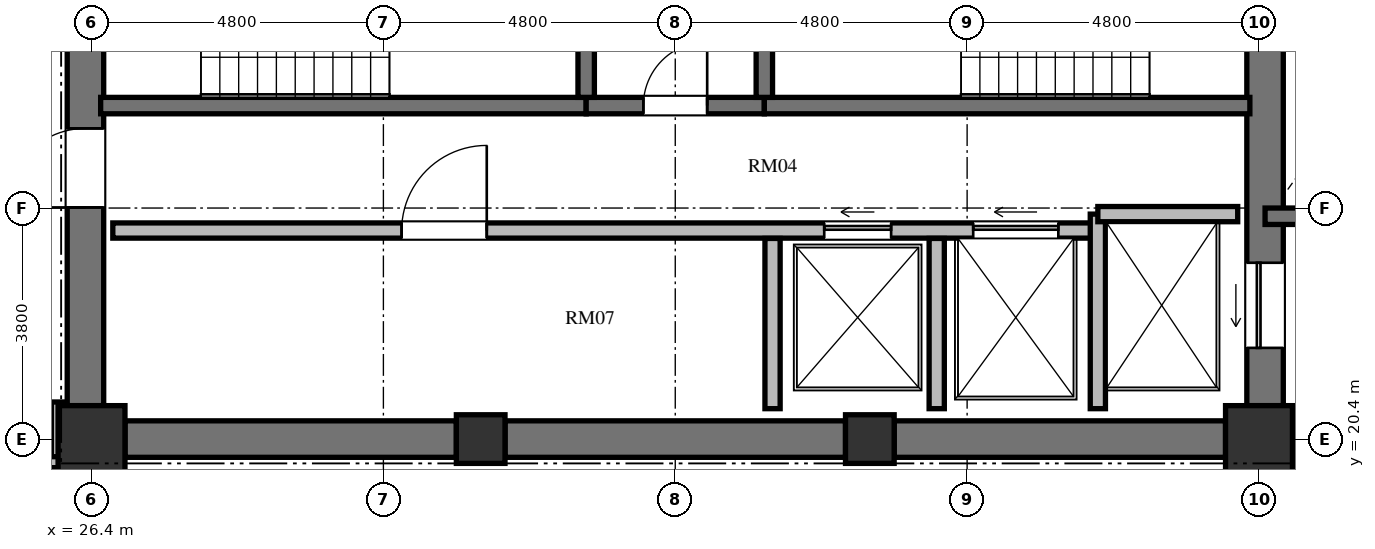
"""IFC4 building model, lengths in metres.
Left out: names, types, materials, properties, quantities, classifications, styles, units other than length and angle.
Written with IfcOpenShell. Run it as: python <this file> out.ifc"""

import sys

from ifc_helpers import new_model, si_unit, direction, frame, frame_2d, origin, origin_2d, place, context, subcontext, project, spatial, rectangle, extrude, element, fill, save


model = new_model("IFC4")
c1 = context("Model", 3, precision=1e-05, world=origin(), true_north=direction((0.0, 1.0)))
c2 = subcontext(c1, "Body", "Model", "MODEL_VIEW")
j1 = project(units=[si_unit("LENGTHUNIT", "METRE"), si_unit("PLANEANGLEUNIT", "RADIAN")], contexts=[c1])
p1 = place(None, origin())
s1 = spatial("IfcSite", under=j1, at=p1, CompositionType="ELEMENT")
p2 = place(p1, origin())
s2 = spatial("IfcBuilding", under=s1, at=p2, CompositionType="ELEMENT")
p3 = place(p2, frame((0.0, 0.0, 202.128)))
s3 = spatial("IfcBuildingStorey", under=s2, at=p3, CompositionType="ELEMENT", Elevation=202.128)
p4 = place(p3, frame((26.4, 20.4, 0.0), z_axis=(0.0, 0.0, 1.0), x_axis=(1.0, 0.0, 0.0)))
e1 = element("IfcColumn", 1, at=p4, inside=s3, PredefinedType="COLUMN", context=c2, shape_type="SweptSolid", body=[
    extrude(rectangle(XDim=1.1, YDim=1.1, at=origin_2d()), origin(), (0.0, 0.0, 1.0), 3.648),
])
for number, where, z_axis, x_axis in (
    (2, (32.8, 20.4, 0.0), (0.0, 0.0, 1.0), (1.0, 0.0, 0.0)),
    (3, (39.2, 20.4, 0.0), (0.0, 0.0, 1.0), (1.0, 0.0, 0.0)),
):
    element("IfcColumn", number, at=place(p3, frame(where, z_axis=z_axis, x_axis=x_axis)), inside=s3, PredefinedType="COLUMN", context=c2, shape_type="SweptSolid", body=[
        extrude(rectangle(XDim=0.8, YDim=0.8, at=origin_2d()), origin(), (0.0, 0.0, 1.0), 3.648),
    ])
p5 = place(p3, frame((45.6, 20.4, 0.0), z_axis=(0.0, 0.0, 1.0), x_axis=(1.0, 0.0, 0.0)))
e4 = element("IfcColumn", 4, at=p5, inside=s3, PredefinedType="COLUMN", context=c2, shape_type="SweptSolid", body=[
    extrude(rectangle(XDim=1.1, YDim=1.1, at=origin_2d()), origin(), (0.0, 0.0, 1.0), 3.648),
])
p6 = place(p3, frame((26.3, 20.95, 0.0), z_axis=(0.0, 0.0, 1.0), x_axis=(0.0, 1.0, 0.0)))
e5 = element("IfcWall", 5, at=p6, inside=s3, PredefinedType="SHEAR", context=c2, shape_type="SweptSolid", body=[
    extrude(rectangle(XDim=14.1, YDim=0.6, at=frame_2d((7.05, 0.0))), origin(), (0.0, 0.0, 1.0), 3.648),
])
p7 = place(p6, frame((6.5, 0.0, 0.0)))
e6 = element("IfcOpeningElement", 6, at=p7, cuts=e5, PredefinedType="OPENING", context=c2, shape_type="SweptSolid", body=[
    extrude(rectangle(XDim=1.2, YDim=2.15, at=frame_2d((0.6, 1.075))), frame((0.0, 0.31, 0.0), z_axis=(0.0, -1.0, 0.0), x_axis=(1.0, 0.0, 0.0)), (0.0, 0.0, 1.0), 0.62),
])
p8 = place(p6, frame((9.6, 0.0, 0.0)))
e7 = element("IfcOpeningElement", 7, at=p8, cuts=e5, PredefinedType="OPENING", context=c2, shape_type="SweptSolid", body=[
    extrude(rectangle(XDim=1.3, YDim=2.2, at=frame_2d((0.65, 1.1))), frame((0.0, 0.31, 0.0), z_axis=(0.0, -1.0, 0.0), x_axis=(1.0, 0.0, 0.0)), (0.0, 0.0, 1.0), 0.62),
])
p9 = place(p6, frame((3.26, 0.0, 0.0)))
e8 = element("IfcOpeningElement", 8, at=p9, cuts=e5, PredefinedType="OPENING", context=c2, shape_type="SweptSolid", body=[
    extrude(rectangle(XDim=1.3, YDim=2.2, at=frame_2d((0.65, 1.1))), frame((0.0, 0.31, 0.0), z_axis=(0.0, -1.0, 0.0), x_axis=(1.0, 0.0, 0.0)), (0.0, 0.0, 1.0), 0.62),
])
p10 = place(p3, frame((45.7, 20.95, 0.0), z_axis=(0.0, 0.0, 1.0), x_axis=(0.0, 1.0, 0.0)))
e9 = element("IfcWall", 9, at=p10, inside=s3, PredefinedType="SHEAR", context=c2, shape_type="SweptSolid", body=[
    extrude(rectangle(XDim=14.1, YDim=0.6, at=frame_2d((7.05, 0.0))), origin(), (0.0, 0.0, 1.0), 3.648),
])
p11 = place(p10, frame((11.75, 0.0, 0.0)))
e10 = element("IfcOpeningElement", 10, at=p11, cuts=e9, PredefinedType="OPENING", context=c2, shape_type="SweptSolid", body=[
    extrude(rectangle(XDim=1.4, YDim=2.3, at=frame_2d((0.7, 1.15))), frame((0.0, 0.31, 0.0), z_axis=(0.0, -1.0, 0.0), x_axis=(1.0, 0.0, 0.0)), (0.0, 0.0, 1.0), 0.62),
])
p12 = place(p10, frame((0.95, 0.0, 0.0)))
e11 = element("IfcOpeningElement", 11, at=p12, cuts=e9, PredefinedType="OPENING", context=c2, shape_type="SweptSolid", body=[
    extrude(rectangle(XDim=1.4, YDim=2.3, at=frame_2d((0.7, 1.15))), frame((0.0, 0.31, 0.0), z_axis=(0.0, -1.0, 0.0), x_axis=(1.0, 0.0, 0.0)), (0.0, 0.0, 1.0), 0.62),
])
p13 = place(p3, frame((26.95, 20.4, 0.0), z_axis=(0.0, 0.0, 1.0), x_axis=(1.0, 0.0, 0.0)))
e12 = element("IfcWall", 12, at=p13, inside=s3, PredefinedType="SHEAR", context=c2, shape_type="SweptSolid", body=[
    extrude(rectangle(XDim=5.45, YDim=0.6, at=frame_2d((2.725, 0.0))), origin(), (0.0, 0.0, 1.0), 3.648),
])
p14 = place(p3, frame((33.2, 20.4, 0.0), z_axis=(0.0, 0.0, 1.0), x_axis=(1.0, 0.0, 0.0)))
e13 = element("IfcWall", 13, at=p14, inside=s3, PredefinedType="SHEAR", context=c2, shape_type="SweptSolid", body=[
    extrude(rectangle(XDim=5.6, YDim=0.6, at=frame_2d((2.8, 0.0))), origin(), (0.0, 0.0, 1.0), 3.648),
])
p15 = place(p3, frame((39.6, 20.4, 0.0), z_axis=(0.0, 0.0, 1.0), x_axis=(1.0, 0.0, 0.0)))
e14 = element("IfcWall", 14, at=p15, inside=s3, PredefinedType="SHEAR", context=c2, shape_type="SweptSolid", body=[
    extrude(rectangle(XDim=5.45, YDim=0.6, at=frame_2d((2.725, 0.0))), origin(), (0.0, 0.0, 1.0), 3.648),
])
p16 = place(p3, frame((26.55, 25.885, 0.0), z_axis=(0.0, 0.0, 1.0), x_axis=(1.0, 0.0, 0.0)))
e15 = element("IfcWall", 15, at=p16, inside=s3, PredefinedType="SHEAR", context=c2, shape_type="SweptSolid", body=[
    extrude(rectangle(XDim=7.985, YDim=0.27, at=frame_2d((3.992, 0.0))), origin(), (0.0, 0.0, 1.0), 3.648),
])
p17 = place(p3, frame((34.535, 25.885, 0.0), z_axis=(0.0, 0.0, 1.0), x_axis=(1.0, 0.0, 0.0)))
e16 = element("IfcWall", 16, at=p17, inside=s3, PredefinedType="SHEAR", context=c2, shape_type="SweptSolid", body=[
    extrude(rectangle(XDim=2.93, YDim=0.27, at=frame_2d((1.465, 0.0))), origin(), (0.0, 0.0, 1.0), 3.648),
])
p18 = place(p17, frame((0.94, 0.0, 0.0)))
e17 = element("IfcOpeningElement", 17, at=p18, cuts=e16, PredefinedType="OPENING", context=c2, shape_type="SweptSolid", body=[
    extrude(rectangle(XDim=1.05, YDim=2.15, at=frame_2d((0.525, 1.075))), frame((0.0, 0.145, 0.0), z_axis=(0.0, -1.0, 0.0), x_axis=(1.0, 0.0, 0.0)), (0.0, 0.0, 1.0), 0.29),
])
p19 = place(p3, frame((37.465, 25.885, 0.0), z_axis=(0.0, 0.0, 1.0), x_axis=(1.0, 0.0, 0.0)))
e18 = element("IfcWall", 18, at=p19, inside=s3, PredefinedType="SHEAR", context=c2, shape_type="SweptSolid", body=[
    extrude(rectangle(XDim=7.985, YDim=0.27, at=frame_2d((3.992, 0.0))), origin(), (0.0, 0.0, 1.0), 3.648),
])
for number, where, z_axis, x_axis in (
    (19, (34.535, 26.02, 0.0), (0.0, 0.0, 1.0), (0.0, 1.0, 0.0)),
    (20, (37.465, 26.02, 0.0), (0.0, 0.0, 1.0), (0.0, 1.0, 0.0)),
):
    element("IfcWall", number, at=place(p3, frame(where, z_axis=z_axis, x_axis=x_axis)), inside=s3, PredefinedType="SHEAR", context=c2, shape_type="SweptSolid", body=[
        extrude(rectangle(XDim=4.08, YDim=0.27, at=frame_2d((2.04, 0.0))), origin(), (0.0, 0.0, 1.0), 3.648),
    ])
p20 = place(p3, frame((26.75, 23.83, 0.0), z_axis=(0.0, 0.0, 1.0), x_axis=(1.0, 0.0, 0.0)))
e21 = element("IfcWall", 21, at=p20, inside=s3, PredefinedType="SOLIDWALL", context=c2, shape_type="SweptSolid", body=[
    extrude(rectangle(XDim=16.2, YDim=0.25, at=frame_2d((8.1, 0.0))), origin(), (0.0, 0.0, 1.0), 3.448),
])
p21 = place(p20, frame((4.75, 0.0, 0.0)))
e22 = element("IfcOpeningElement", 22, at=p21, cuts=e21, PredefinedType="OPENING", context=c2, shape_type="SweptSolid", body=[
    extrude(rectangle(XDim=1.4, YDim=2.2, at=frame_2d((0.7, 1.1))), frame((0.0, 0.135, 0.0), z_axis=(0.0, -1.0, 0.0), x_axis=(1.0, 0.0, 0.0)), (0.0, 0.0, 1.0), 0.27),
])
p22 = place(p20, frame((11.7, 0.0, 0.0)))
e23 = element("IfcOpeningElement", 23, at=p22, cuts=e21, PredefinedType="OPENING", context=c2, shape_type="SweptSolid", body=[
    extrude(rectangle(XDim=1.1, YDim=2.2, at=frame_2d((0.55, 1.1))), frame((0.0, 0.135, 0.0), z_axis=(0.0, -1.0, 0.0), x_axis=(1.0, 0.0, 0.0)), (0.0, 0.0, 1.0), 0.27),
])
p23 = place(p20, frame((14.15, 0.0, 0.0)))
e24 = element("IfcOpeningElement", 24, at=p23, cuts=e21, PredefinedType="OPENING", context=c2, shape_type="SweptSolid", body=[
    extrude(rectangle(XDim=1.4, YDim=2.3, at=frame_2d((0.7, 1.15))), frame((0.0, 0.135, 0.0), z_axis=(0.0, -1.0, 0.0), x_axis=(1.0, 0.0, 0.0)), (0.0, 0.0, 1.0), 0.27),
])
p24 = place(p3, frame((42.95, 20.9, 0.0), z_axis=(0.0, 0.0, 1.0), x_axis=(0.0, 1.0, 0.0)))
e25 = element("IfcWall", 25, at=p24, inside=s3, PredefinedType="SOLIDWALL", context=c2, shape_type="SweptSolid", body=[
    extrude(rectangle(XDim=3.2, YDim=0.25, at=frame_2d((1.6, 0.0))), origin(), (0.0, 0.0, 1.0), 3.448),
])
p25 = place(p3, frame((42.95, 24.1, 0.0), z_axis=(0.0, 0.0, 1.0), x_axis=(1.0, 0.0, 0.0)))
e26 = element("IfcWall", 26, at=p25, inside=s3, PredefinedType="SOLIDWALL", context=c2, shape_type="SweptSolid", body=[
    extrude(rectangle(XDim=2.3, YDim=0.25, at=frame_2d((1.15, 0.0))), origin(), (0.0, 0.0, 1.0), 3.448),
])
for number, where, z_axis, x_axis in (
    (27, (37.6, 20.9, 0.0), (0.0, 0.0, 1.0), (0.0, 1.0, 0.0)),
    (28, (40.3, 20.9, 0.0), (0.0, 0.0, 1.0), (0.0, 1.0, 0.0)),
):
    element("IfcWall", number, at=place(p3, frame(where, z_axis=z_axis, x_axis=x_axis)), inside=s3, PredefinedType="SOLIDWALL", context=c2, shape_type="SweptSolid", body=[
        extrude(rectangle(XDim=2.8, YDim=0.25, at=frame_2d((1.4, 0.0))), origin(), (0.0, 0.0, 1.0), 3.448),
    ])
p26 = place(p3, frame((45.7, 24.065, 0.0), z_axis=(0.0, 0.0, 1.0), x_axis=(1.0, 0.0, 0.0)))
e29 = element("IfcWall", 29, at=p26, inside=s3, PredefinedType="SHEAR", context=c2, shape_type="SweptSolid", body=[
    extrude(rectangle(XDim=4.715, YDim=0.27, at=frame_2d((2.357, 0.0))), origin(), (0.0, 0.0, 1.0), 3.648),
])
p27 = place(p3, frame((45.7, 20.02, 0.0), z_axis=(0.0, 0.0, 1.0), x_axis=(1.0, 0.0, 0.0)))
e30 = element("IfcWall", 30, at=p27, inside=s3, PredefinedType="SOLIDWALL", context=c2, shape_type="SweptSolid", body=[
    extrude(rectangle(XDim=4.715, YDim=0.25, at=frame_2d((2.357, 0.0))), origin(), (0.0, 0.0, 1.0), 3.448),
])
p28 = place(p3, frame((25.83, 21.01, 0.0), z_axis=(0.0, 0.0, 1.0), x_axis=(0.0, -1.0, 0.0)))
e31 = element("IfcWall", 31, at=p28, inside=s3, PredefinedType="PARTITIONING", context=c2, shape_type="SweptSolid", body=[
    extrude(rectangle(XDim=1.03, YDim=0.18, at=frame_2d((0.515, 0.0))), origin(), (0.0, 0.0, 1.0), 3.448),
])
p29 = place(p3, frame((25.87, 20.02, 0.0), z_axis=(0.0, 0.0, 1.0), x_axis=(-1.0, 0.0, 0.0)))
e32 = element("IfcWall", 32, at=p29, inside=s3, PredefinedType="PARTITIONING", context=c2, shape_type="SweptSolid", body=[
    extrude(rectangle(XDim=2.56, YDim=0.18, at=frame_2d((1.28, 0.0))), origin(), (0.0, 0.0, 1.0), 3.448),
])
p30 = place(p18, origin())
e33 = element("IfcDoor", 33, at=p30, inside=s3, OperationType="SINGLE_SWING_RIGHT", PredefinedType="DOOR", context=c2, shape_type="SweptSolid", body=[
    extrude(rectangle(XDim=1.05, YDim=2.15, at=frame_2d((0.525, 1.075))), frame((0.0, 0.025, 0.0), z_axis=(0.0, -1.0, 0.0), x_axis=(1.0, 0.0, 0.0)), (0.0, 0.0, 1.0), 0.05),
])
fill(e17, e33)
p31 = place(p9, origin())
e34 = element("IfcDoor", 34, at=p31, inside=s3, OperationType="SINGLE_SWING_LEFT", PredefinedType="DOOR", context=c2, shape_type="SweptSolid", body=[
    extrude(rectangle(XDim=1.3, YDim=2.2, at=frame_2d((0.65, 1.1))), frame((0.0, 0.025, 0.0), z_axis=(0.0, -1.0, 0.0), x_axis=(1.0, 0.0, 0.0)), (0.0, 0.0, 1.0), 0.05),
])
fill(e8, e34)
p32 = place(p21, origin())
e35 = element("IfcDoor", 35, at=p32, inside=s3, OperationType="SINGLE_SWING_RIGHT", PredefinedType="DOOR", context=c2, shape_type="SweptSolid", body=[
    extrude(rectangle(XDim=1.4, YDim=2.2, at=frame_2d((0.7, 1.1))), frame((0.0, 0.025, 0.0), z_axis=(0.0, -1.0, 0.0), x_axis=(1.0, 0.0, 0.0)), (0.0, 0.0, 1.0), 0.05),
])
fill(e22, e35)
p33 = place(p22, origin())
e36 = element("IfcDoor", 36, at=p33, inside=s3, OperationType="SLIDING_TO_LEFT", PredefinedType="DOOR", context=c2, shape_type="SweptSolid", body=[
    extrude(rectangle(XDim=1.1, YDim=2.2, at=frame_2d((0.55, 1.1))), frame((0.0, 0.025, 0.0), z_axis=(0.0, -1.0, 0.0), x_axis=(1.0, 0.0, 0.0)), (0.0, 0.0, 1.0), 0.05),
])
fill(e23, e36)
p34 = place(p12, origin())
e37 = element("IfcDoor", 37, at=p34, inside=s3, OperationType="SLIDING_TO_LEFT", PredefinedType="DOOR", context=c2, shape_type="SweptSolid", body=[
    extrude(rectangle(XDim=1.4, YDim=2.3, at=frame_2d((0.7, 1.15))), frame((0.0, 0.025, 0.0), z_axis=(0.0, -1.0, 0.0), x_axis=(1.0, 0.0, 0.0)), (0.0, 0.0, 1.0), 0.05),
])
fill(e11, e37)
p35 = place(p23, origin())
e38 = element("IfcDoor", 38, at=p35, inside=s3, OperationType="SLIDING_TO_LEFT", PredefinedType="DOOR", context=c2, shape_type="SweptSolid", body=[
    extrude(rectangle(XDim=1.4, YDim=2.3, at=frame_2d((0.7, 1.15))), frame((0.0, 0.025, 0.0), z_axis=(0.0, -1.0, 0.0), x_axis=(1.0, 0.0, 0.0)), (0.0, 0.0, 1.0), 0.05),
])
fill(e24, e38)
save(model, sys.argv[1])
